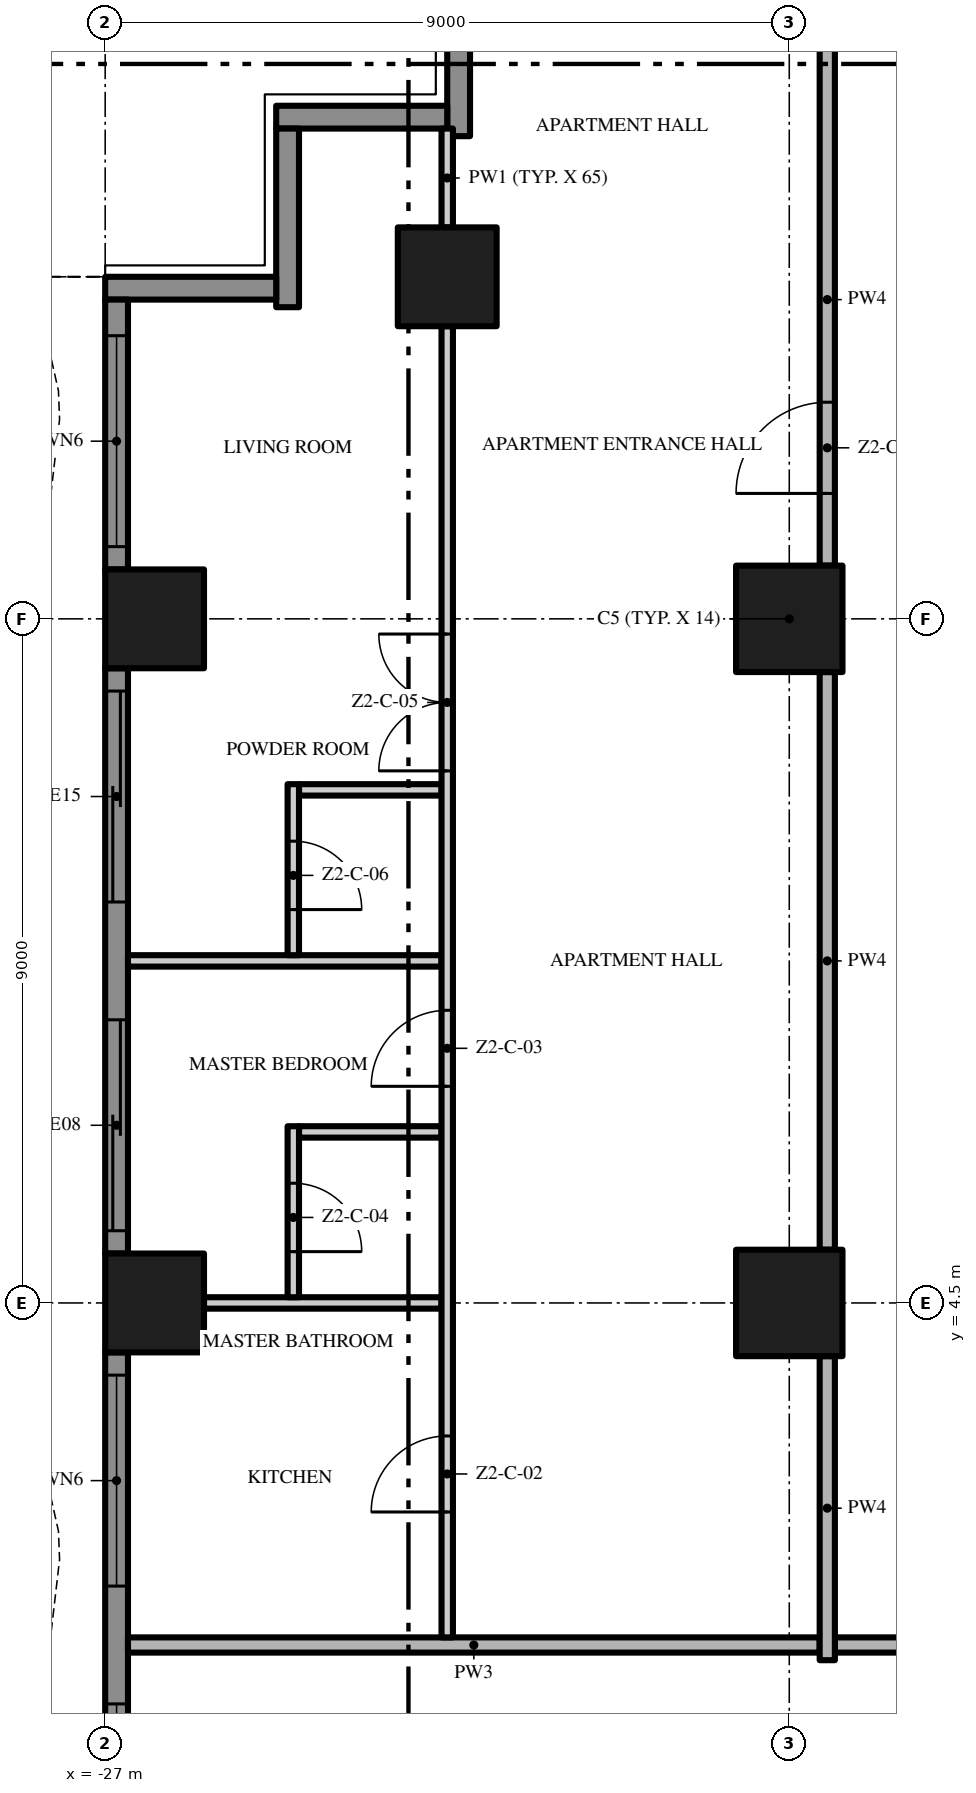
"""IFC4 building model, lengths in metres.
Left out: names, types, materials, properties, quantities, classifications, styles, units other than length and angle.
Written with IfcOpenShell. Run it as: python <this file> out.ifc"""

import sys

from ifc_helpers import new_model, si_unit, direction, frame, frame_2d, origin, origin_2d, place, context, subcontext, project, spatial, polyline, rectangle, outline, extrude, element, fill, save


model = new_model("IFC4")
c1 = context("Model", 3, precision=1e-05, world=origin(), true_north=direction((0.0, 1.0)))
c2 = subcontext(c1, "Body", "Model", "MODEL_VIEW")
j1 = project(units=[si_unit("LENGTHUNIT", "METRE"), si_unit("PLANEANGLEUNIT", "RADIAN")], contexts=[c1])
p1 = place(None, origin())
s1 = spatial("IfcSite", under=j1, at=p1, CompositionType="ELEMENT")
p2 = place(p1, origin())
s2 = spatial("IfcBuilding", under=s1, at=p2, CompositionType="ELEMENT")
p3 = place(p2, frame((0.0, 0.0, 96.0)))
s3 = spatial("IfcBuildingStorey", under=s2, at=p3, CompositionType="ELEMENT", Elevation=96.0)
for number, where, z_axis, x_axis in (
    (1, (-18.0, 13.5, 0.0), (0.0, 0.0, 1.0), (1.0, 0.0, 0.0)),
    (2, (-18.0, 4.5, 0.0), (0.0, 0.0, 1.0), (1.0, 0.0, 0.0)),
):
    element("IfcColumn", number, at=place(p3, frame(where, z_axis=z_axis, x_axis=x_axis)), inside=s3, PredefinedType="COLUMN", context=c2, shape_type="SweptSolid", body=[
        extrude(rectangle(XDim=1.4, YDim=1.4, at=origin_2d()), origin(), (0.0, 0.0, 1.0), 3.5),
    ])
for number, where, z_axis, x_axis in (
    (3, (-26.35, 13.5, 0.0), (0.0, 0.0, 1.0), (1.0, 0.0, 0.0)),
    (4, (-22.5, 18.0, 0.0), (0.0, 0.0, 1.0), (1.0, 0.0, 0.0)),
    (5, (-26.35, 4.5, 0.0), (0.0, 0.0, 1.0), (1.0, 0.0, 0.0)),
):
    element("IfcColumn", number, at=place(p3, frame(where, z_axis=z_axis, x_axis=x_axis)), inside=s3, PredefinedType="COLUMN", context=c2, shape_type="SweptSolid", body=[
        extrude(rectangle(XDim=1.3, YDim=1.3, at=origin_2d()), origin(), (0.0, 0.0, 1.0), 3.5),
    ])
p4 = place(p3, frame((-22.35, 19.85, 0.0), z_axis=(0.0, 0.0, 1.0), x_axis=(0.0, 1.0, 0.0)))
e6 = element("IfcWall", 6, at=p4, inside=s3, PredefinedType="SOLIDWALL", context=c2, shape_type="SweptSolid", body=[
    extrude(rectangle(XDim=2.35, YDim=0.3, at=frame_2d((1.175, 0.0))), origin(), (0.0, 0.0, 1.0), 3.5),
])
p5 = place(p3, frame((-24.75, 20.1, 0.0), z_axis=(0.0, 0.0, 1.0), x_axis=(1.0, 0.0, 0.0)))
e7 = element("IfcWall", 7, at=p5, inside=s3, PredefinedType="SOLIDWALL", context=c2, shape_type="SweptSolid", body=[
    extrude(rectangle(XDim=2.25, YDim=0.3, at=frame_2d((1.125, 0.0))), origin(), (0.0, 0.0, 1.0), 3.5),
])
p6 = place(p3, frame((-24.6, 17.6, 0.0), z_axis=(0.0, 0.0, 1.0), x_axis=(0.0, 1.0, 0.0)))
e8 = element("IfcWall", 8, at=p6, inside=s3, PredefinedType="SOLIDWALL", context=c2, shape_type="SweptSolid", body=[
    extrude(rectangle(XDim=2.35, YDim=0.3, at=frame_2d((1.175, 0.0))), origin(), (0.0, 0.0, 1.0), 3.5),
])
p7 = place(p3, frame((-27.0, 17.85, 0.0), z_axis=(0.0, 0.0, 1.0), x_axis=(1.0, 0.0, 0.0)))
e9 = element("IfcWall", 9, at=p7, inside=s3, PredefinedType="SOLIDWALL", context=c2, shape_type="SweptSolid", body=[
    extrude(rectangle(XDim=2.25, YDim=0.3, at=frame_2d((1.125, 0.0))), origin(), (0.0, 0.0, 1.0), 3.5),
])
p8 = place(p3, frame((-26.85, 14.15, 0.0), z_axis=(0.0, 0.0, 1.0), x_axis=(0.0, 1.0, 0.0)))
e10 = element("IfcWall", 10, at=p8, inside=s3, PredefinedType="SOLIDWALL", context=c2, shape_type="SweptSolid", body=[
    extrude(rectangle(XDim=3.55, YDim=0.3, at=frame_2d((1.775, 0.0))), origin(), (0.0, 0.0, 1.0), 3.5),
])
p9 = place(p8, frame((0.3, 0.0, 0.45)))
e11 = element("IfcOpeningElement", 11, at=p9, cuts=e10, PredefinedType="OPENING", context=c2, shape_type="SweptSolid", body=[
    extrude(rectangle(XDim=2.775, YDim=2.65, at=frame_2d((1.387, 1.325))), frame((0.0, 0.16, 0.0), z_axis=(0.0, -1.0, 0.0), x_axis=(1.0, 0.0, 0.0)), (0.0, 0.0, 1.0), 0.32),
])
p10 = place(p3, frame((-26.85, 5.15, 0.0), z_axis=(0.0, 0.0, 1.0), x_axis=(0.0, 1.0, 0.0)))
e12 = element("IfcWall", 12, at=p10, inside=s3, PredefinedType="SOLIDWALL", context=c2, shape_type="SweptSolid", body=[
    extrude(rectangle(XDim=7.7, YDim=0.3, at=frame_2d((3.85, 0.0))), origin(), (0.0, 0.0, 1.0), 3.5),
])
p11 = place(p10, frame((4.625, 0.0, 0.0)))
e13 = element("IfcOpeningElement", 13, at=p11, cuts=e12, PredefinedType="OPENING", context=c2, shape_type="SweptSolid", body=[
    extrude(rectangle(XDim=2.775, YDim=2.4, at=frame_2d((1.387, 1.2))), frame((0.0, 0.16, 0.0), z_axis=(0.0, -1.0, 0.0), x_axis=(1.0, 0.0, 0.0)), (0.0, 0.0, 1.0), 0.32),
])
p12 = place(p10, frame((0.3, 0.0, 0.0)))
e14 = element("IfcOpeningElement", 14, at=p12, cuts=e12, PredefinedType="OPENING", context=c2, shape_type="SweptSolid", body=[
    extrude(rectangle(XDim=2.775, YDim=2.4, at=frame_2d((1.387, 1.2))), frame((0.0, 0.16, 0.0), z_axis=(0.0, -1.0, 0.0), x_axis=(1.0, 0.0, 0.0)), (0.0, 0.0, 1.0), 0.32),
])
p13 = place(p3, frame((-26.85, -3.85, 0.0), z_axis=(0.0, 0.0, 1.0), x_axis=(0.0, 1.0, 0.0)))
e15 = element("IfcWall", 15, at=p13, inside=s3, PredefinedType="SOLIDWALL", context=c2, shape_type="SweptSolid", body=[
    extrude(rectangle(XDim=7.7, YDim=0.3, at=frame_2d((3.85, 0.0))), origin(), (0.0, 0.0, 1.0), 3.5),
])
p14 = place(p13, frame((4.625, 0.0, 0.45)))
e16 = element("IfcOpeningElement", 16, at=p14, cuts=e15, PredefinedType="OPENING", context=c2, shape_type="SweptSolid", body=[
    extrude(rectangle(XDim=2.775, YDim=2.65, at=frame_2d((1.387, 1.325))), frame((0.0, 0.16, 0.0), z_axis=(0.0, -1.0, 0.0), x_axis=(1.0, 0.0, 0.0)), (0.0, 0.0, 1.0), 0.32),
])
p15 = place(p13, frame((0.3, 0.0, 0.45)))
e17 = element("IfcOpeningElement", 17, at=p15, cuts=e15, PredefinedType="OPENING", context=c2, shape_type="SweptSolid", body=[
    extrude(rectangle(XDim=2.775, YDim=2.65, at=frame_2d((1.387, 1.325))), frame((0.0, 0.16, 0.0), z_axis=(0.0, -1.0, 0.0), x_axis=(1.0, 0.0, 0.0)), (0.0, 0.0, 1.0), 0.32),
])
p16 = place(p3, origin())
e18 = element("IfcWall", 18, at=p16, inside=s3, PredefinedType="USERDEFINED", context=c2, shape_type="SweptSolid", body=[
    extrude(outline(polyline([(-27.951, 18.0), (-27.615, 16.5), (-27.6, 16.125), (-27.731, 15.0), (-28.255, 13.5), (-28.988, 12.0), (-29.649, 10.5), (-29.985, 9.0), (-30.0, 8.625), (-29.869, 7.5), (-29.345, 6.0), (-28.612, 4.5), (-27.951, 3.0), (-27.615, 1.5), (-27.6, 1.125), (-27.731, 0.0), (-28.255, -1.5), (-28.988, -3.0), (-29.649, -4.5), (-29.985, -6.0), (-30.0, -6.375), (-29.869, -7.5), (-29.345, -9.0), (-28.612, -10.5), (-27.951, -12.0), (-27.615, -13.5), (-27.6, -13.875), (-27.731, -15.0), (-28.255, -16.5), (-28.988, -18.0), (-28.763, -18.11), (-28.024, -16.596), (-27.486, -15.056), (-27.349, -13.885), (-27.366, -13.467), (-27.713, -11.921), (-28.385, -10.395), (-29.114, -8.904), (-29.624, -7.444), (-29.749, -6.365), (-29.736, -6.033), (-29.41, -4.579), (-28.761, -3.105), (-28.024, -1.596), (-27.486, -0.056), (-27.349, 1.115), (-27.366, 1.533), (-27.713, 3.079), (-28.385, 4.605), (-29.114, 6.096), (-29.624, 7.556), (-29.749, 8.635), (-29.736, 8.967), (-29.41, 10.421), (-28.761, 11.895), (-28.024, 13.404), (-27.486, 14.944), (-27.349, 16.115), (-27.366, 16.533), (-27.708, 18.055), (-27.951, 18.0)])), origin(), (0.0, 0.0, 1.0), 0.9),
])
p17 = place(p3, frame((-0.1, 0.0, 0.0), z_axis=(0.0, 0.0, 1.0), x_axis=(-1.0, 0.0, 0.0)))
e19 = element("IfcWall", 19, at=p17, inside=s3, PredefinedType="PARTITIONING", context=c2, shape_type="SweptSolid", body=[
    extrude(rectangle(XDim=17.3, YDim=0.2, at=frame_2d((8.65, 0.0))), origin(), (0.0, 0.0, 1.0), 3.5),
])
p18 = place(p17, frame((8.15, 0.0, 0.0)))
e20 = element("IfcOpeningElement", 20, at=p18, cuts=e19, PredefinedType="OPENING", context=c2, shape_type="SweptSolid", body=[
    extrude(rectangle(XDim=1.5, YDim=2.4, at=frame_2d((0.75, 1.2))), frame((0.0, 0.11, 0.0), z_axis=(0.0, -1.0, 0.0), x_axis=(1.0, 0.0, 0.0)), (0.0, 0.0, 1.0), 0.22),
])
p19 = place(p3, frame((-26.7, 0.0, 0.0), z_axis=(0.0, 0.0, 1.0), x_axis=(1.0, 0.0, 0.0)))
e21 = element("IfcWall", 21, at=p19, inside=s3, PredefinedType="PARTITIONING", context=c2, shape_type="SweptSolid", body=[
    extrude(rectangle(XDim=9.1, YDim=0.2, at=frame_2d((4.55, 0.0))), origin(), (0.0, 0.0, 1.0), 3.5),
])
p20 = place(p3, frame((-25.7, 4.5, 0.0), z_axis=(0.0, 0.0, 1.0), x_axis=(1.0, 0.0, 0.0)))
e22 = element("IfcWall", 22, at=p20, inside=s3, PredefinedType="PARTITIONING", context=c2, shape_type="SweptSolid", body=[
    extrude(rectangle(XDim=3.125, YDim=0.15, at=frame_2d((1.562, 0.0))), origin(), (0.0, 0.0, 1.0), 3.5),
])
p21 = place(p3, frame((-24.45, 6.75, 0.0), z_axis=(0.0, 0.0, 1.0), x_axis=(1.0, 0.0, 0.0)))
e23 = element("IfcWall", 23, at=p21, inside=s3, PredefinedType="PARTITIONING", context=c2, shape_type="SweptSolid", body=[
    extrude(rectangle(XDim=1.875, YDim=0.15, at=frame_2d((0.938, 0.0))), origin(), (0.0, 0.0, 1.0), 3.5),
])
p22 = place(p3, frame((-26.7, 9.0, 0.0), z_axis=(0.0, 0.0, 1.0), x_axis=(1.0, 0.0, 0.0)))
e24 = element("IfcWall", 24, at=p22, inside=s3, PredefinedType="PARTITIONING", context=c2, shape_type="SweptSolid", body=[
    extrude(rectangle(XDim=4.125, YDim=0.15, at=frame_2d((2.062, 0.0))), origin(), (0.0, 0.0, 1.0), 3.5),
])
p23 = place(p3, frame((-24.45, 11.25, 0.0), z_axis=(0.0, 0.0, 1.0), x_axis=(1.0, 0.0, 0.0)))
e25 = element("IfcWall", 25, at=p23, inside=s3, PredefinedType="PARTITIONING", context=c2, shape_type="SweptSolid", body=[
    extrude(rectangle(XDim=1.875, YDim=0.15, at=frame_2d((0.938, 0.0))), origin(), (0.0, 0.0, 1.0), 3.5),
])
p24 = place(p3, frame((-24.525, 6.825, 0.0), z_axis=(0.0, 0.0, 1.0), x_axis=(0.0, -1.0, 0.0)))
e26 = element("IfcWall", 26, at=p24, inside=s3, PredefinedType="PARTITIONING", context=c2, shape_type="SweptSolid", body=[
    extrude(rectangle(XDim=2.25, YDim=0.15, at=frame_2d((1.125, 0.0))), origin(), (0.0, 0.0, 1.0), 3.5),
])
p25 = place(p24, frame((0.75, 0.0, 0.0)))
e27 = element("IfcOpeningElement", 27, at=p25, cuts=e26, PredefinedType="OPENING", context=c2, shape_type="SweptSolid", body=[
    extrude(rectangle(XDim=0.9, YDim=2.1, at=frame_2d((0.45, 1.05))), frame((0.0, 0.085, 0.0), z_axis=(0.0, -1.0, 0.0), x_axis=(1.0, 0.0, 0.0)), (0.0, 0.0, 1.0), 0.17),
])
p26 = place(p3, frame((-24.525, 11.325, 0.0), z_axis=(0.0, 0.0, 1.0), x_axis=(0.0, -1.0, 0.0)))
e28 = element("IfcWall", 28, at=p26, inside=s3, PredefinedType="PARTITIONING", context=c2, shape_type="SweptSolid", body=[
    extrude(rectangle(XDim=2.25, YDim=0.15, at=frame_2d((1.125, 0.0))), origin(), (0.0, 0.0, 1.0), 3.5),
])
p27 = place(p26, frame((0.75, 0.0, 0.0)))
e29 = element("IfcOpeningElement", 29, at=p27, cuts=e28, PredefinedType="OPENING", context=c2, shape_type="SweptSolid", body=[
    extrude(rectangle(XDim=0.9, YDim=2.1, at=frame_2d((0.45, 1.05))), frame((0.0, 0.085, 0.0), z_axis=(0.0, -1.0, 0.0), x_axis=(1.0, 0.0, 0.0)), (0.0, 0.0, 1.0), 0.17),
])
p28 = place(p3, frame((-22.5, 0.1, 0.0), z_axis=(0.0, 0.0, 1.0), x_axis=(0.0, 1.0, 0.0)))
e30 = element("IfcWall", 30, at=p28, inside=s3, PredefinedType="PARTITIONING", context=c2, shape_type="SweptSolid", body=[
    extrude(rectangle(XDim=17.25, YDim=0.15, at=frame_2d((8.625, 0.0))), origin(), (0.0, 0.0, 1.0), 3.5),
])
p29 = place(p28, frame((1.65, 0.0, 0.0)))
e31 = element("IfcOpeningElement", 31, at=p29, cuts=e30, PredefinedType="OPENING", context=c2, shape_type="SweptSolid", body=[
    extrude(rectangle(XDim=1.0, YDim=2.4, at=frame_2d((0.5, 1.2))), frame((0.0, 0.085, 0.0), z_axis=(0.0, -1.0, 0.0), x_axis=(1.0, 0.0, 0.0)), (0.0, 0.0, 1.0), 0.17),
])
p30 = place(p28, frame((7.25, 0.0, 0.0)))
e32 = element("IfcOpeningElement", 32, at=p30, cuts=e30, PredefinedType="OPENING", context=c2, shape_type="SweptSolid", body=[
    extrude(rectangle(XDim=1.0, YDim=2.4, at=frame_2d((0.5, 1.2))), frame((0.0, 0.085, 0.0), z_axis=(0.0, -1.0, 0.0), x_axis=(1.0, 0.0, 0.0)), (0.0, 0.0, 1.0), 0.17),
])
p31 = place(p28, frame((11.4, 0.0, 0.0)))
e33 = element("IfcOpeningElement", 33, at=p31, cuts=e30, PredefinedType="OPENING", context=c2, shape_type="SweptSolid", body=[
    extrude(rectangle(XDim=1.8, YDim=2.4, at=frame_2d((0.9, 1.2))), frame((0.0, 0.085, 0.0), z_axis=(0.0, -1.0, 0.0), x_axis=(1.0, 0.0, 0.0)), (0.0, 0.0, 1.0), 0.17),
])
p32 = place(p3, frame((-22.5, 18.65, 0.0), z_axis=(0.0, 0.0, 1.0), x_axis=(0.0, 1.0, 0.0)))
e34 = element("IfcWall", 34, at=p32, inside=s3, PredefinedType="PARTITIONING", context=c2, shape_type="SweptSolid", body=[
    extrude(rectangle(XDim=1.3, YDim=0.15, at=frame_2d((0.65, 0.0))), origin(), (0.0, 0.0, 1.0), 3.5),
])
p33 = place(p3, frame((-17.5, -0.2, 0.0), z_axis=(0.0, 0.0, 1.0), x_axis=(0.0, 1.0, 0.0)))
e35 = element("IfcWall", 35, at=p33, inside=s3, PredefinedType="PARTITIONING", context=c2, shape_type="SweptSolid", body=[
    extrude(rectangle(XDim=4.0, YDim=0.2, at=frame_2d((2.0, 0.0))), origin(), (0.0, 0.0, 1.0), 3.5),
])
p34 = place(p3, frame((-17.5, 5.2, 0.0), z_axis=(0.0, 0.0, 1.0), x_axis=(0.0, 1.0, 0.0)))
e36 = element("IfcWall", 36, at=p34, inside=s3, PredefinedType="PARTITIONING", context=c2, shape_type="SweptSolid", body=[
    extrude(rectangle(XDim=7.6, YDim=0.2, at=frame_2d((3.8, 0.0))), origin(), (0.0, 0.0, 1.0), 3.5),
])
p35 = place(p3, frame((-17.5, 14.2, 0.0), z_axis=(0.0, 0.0, 1.0), x_axis=(0.0, 1.0, 0.0)))
e37 = element("IfcWall", 37, at=p35, inside=s3, PredefinedType="PARTITIONING", context=c2, shape_type="SweptSolid", body=[
    extrude(rectangle(XDim=7.0, YDim=0.2, at=frame_2d((3.5, 0.0))), origin(), (0.0, 0.0, 1.0), 3.5),
])
p36 = place(p35, frame((0.95, 0.0, 0.0)))
e38 = element("IfcOpeningElement", 38, at=p36, cuts=e37, PredefinedType="OPENING", context=c2, shape_type="SweptSolid", body=[
    extrude(rectangle(XDim=1.2, YDim=2.4, at=frame_2d((0.6, 1.2))), frame((0.0, 0.11, 0.0), z_axis=(0.0, -1.0, 0.0), x_axis=(1.0, 0.0, 0.0)), (0.0, 0.0, 1.0), 0.22),
])
p37 = place(p9, origin())
e39 = element("IfcWindow", 39, at=p37, inside=s3, PartitioningType="SINGLE_PANEL", PredefinedType="WINDOW", context=c2, shape_type="SweptSolid", body=[
    extrude(rectangle(XDim=2.775, YDim=2.65, at=frame_2d((1.387, 1.325))), frame((0.0, 0.03, 0.0), z_axis=(0.0, -1.0, 0.0), x_axis=(1.0, 0.0, 0.0)), (0.0, 0.0, 1.0), 0.06),
])
fill(e11, e39)
p38 = place(p11, origin())
e40 = element("IfcDoor", 40, at=p38, inside=s3, OperationType="SINGLE_SWING_LEFT", PredefinedType="DOOR", context=c2, shape_type="SweptSolid", body=[
    extrude(rectangle(XDim=2.775, YDim=2.4, at=frame_2d((1.387, 1.2))), frame((0.0, 0.025, 0.0), z_axis=(0.0, -1.0, 0.0), x_axis=(1.0, 0.0, 0.0)), (0.0, 0.0, 1.0), 0.05),
])
fill(e13, e40)
p39 = place(p12, origin())
e41 = element("IfcDoor", 41, at=p39, inside=s3, OperationType="SINGLE_SWING_LEFT", PredefinedType="DOOR", context=c2, shape_type="SweptSolid", body=[
    extrude(rectangle(XDim=2.775, YDim=2.4, at=frame_2d((1.387, 1.2))), frame((0.0, 0.025, 0.0), z_axis=(0.0, -1.0, 0.0), x_axis=(1.0, 0.0, 0.0)), (0.0, 0.0, 1.0), 0.05),
])
fill(e14, e41)
p40 = place(p14, origin())
e42 = element("IfcWindow", 42, at=p40, inside=s3, PartitioningType="SINGLE_PANEL", PredefinedType="WINDOW", context=c2, shape_type="SweptSolid", body=[
    extrude(rectangle(XDim=2.775, YDim=2.65, at=frame_2d((1.387, 1.325))), frame((0.0, 0.03, 0.0), z_axis=(0.0, -1.0, 0.0), x_axis=(1.0, 0.0, 0.0)), (0.0, 0.0, 1.0), 0.06),
])
fill(e16, e42)
p41 = place(p15, origin())
e43 = element("IfcWindow", 43, at=p41, inside=s3, PartitioningType="SINGLE_PANEL", PredefinedType="WINDOW", context=c2, shape_type="SweptSolid", body=[
    extrude(rectangle(XDim=2.775, YDim=2.65, at=frame_2d((1.387, 1.325))), frame((0.0, 0.03, 0.0), z_axis=(0.0, -1.0, 0.0), x_axis=(1.0, 0.0, 0.0)), (0.0, 0.0, 1.0), 0.06),
])
fill(e17, e43)
p42 = place(p36, origin())
e44 = element("IfcDoor", 44, at=p42, inside=s3, OperationType="SINGLE_SWING_LEFT", PredefinedType="DOOR", context=c2, shape_type="SweptSolid", body=[
    extrude(rectangle(XDim=1.2, YDim=2.4, at=frame_2d((0.6, 1.2))), frame((0.0, 0.025, 0.0), z_axis=(0.0, -1.0, 0.0), x_axis=(1.0, 0.0, 0.0)), (0.0, 0.0, 1.0), 0.05),
])
fill(e38, e44)
p43 = place(p29, origin())
e45 = element("IfcDoor", 45, at=p43, inside=s3, OperationType="SINGLE_SWING_LEFT", PredefinedType="DOOR", context=c2, shape_type="SweptSolid", body=[
    extrude(rectangle(XDim=1.0, YDim=2.4, at=frame_2d((0.5, 1.2))), frame((0.0, 0.025, 0.0), z_axis=(0.0, -1.0, 0.0), x_axis=(1.0, 0.0, 0.0)), (0.0, 0.0, 1.0), 0.05),
])
fill(e31, e45)
p44 = place(p30, origin())
e46 = element("IfcDoor", 46, at=p44, inside=s3, OperationType="SINGLE_SWING_LEFT", PredefinedType="DOOR", context=c2, shape_type="SweptSolid", body=[
    extrude(rectangle(XDim=1.0, YDim=2.4, at=frame_2d((0.5, 1.2))), frame((0.0, 0.025, 0.0), z_axis=(0.0, -1.0, 0.0), x_axis=(1.0, 0.0, 0.0)), (0.0, 0.0, 1.0), 0.05),
])
fill(e32, e46)
p45 = place(p25, origin())
e47 = element("IfcDoor", 47, at=p45, inside=s3, OperationType="SINGLE_SWING_RIGHT", PredefinedType="DOOR", context=c2, shape_type="SweptSolid", body=[
    extrude(rectangle(XDim=0.9, YDim=2.1, at=frame_2d((0.45, 1.05))), frame((0.0, 0.025, 0.0), z_axis=(0.0, -1.0, 0.0), x_axis=(1.0, 0.0, 0.0)), (0.0, 0.0, 1.0), 0.05),
])
fill(e27, e47)
p46 = place(p31, origin())
e48 = element("IfcDoor", 48, at=p46, inside=s3, OperationType="DOUBLE_DOOR_SINGLE_SWING", PredefinedType="DOOR", context=c2, shape_type="SweptSolid", body=[
    extrude(rectangle(XDim=1.8, YDim=2.4, at=frame_2d((0.9, 1.2))), frame((0.0, 0.025, 0.0), z_axis=(0.0, -1.0, 0.0), x_axis=(1.0, 0.0, 0.0)), (0.0, 0.0, 1.0), 0.05),
])
fill(e33, e48)
p47 = place(p27, origin())
e49 = element("IfcDoor", 49, at=p47, inside=s3, OperationType="SINGLE_SWING_RIGHT", PredefinedType="DOOR", context=c2, shape_type="SweptSolid", body=[
    extrude(rectangle(XDim=0.9, YDim=2.1, at=frame_2d((0.45, 1.05))), frame((0.0, 0.025, 0.0), z_axis=(0.0, -1.0, 0.0), x_axis=(1.0, 0.0, 0.0)), (0.0, 0.0, 1.0), 0.05),
])
fill(e29, e49)
save(model, sys.argv[1])
